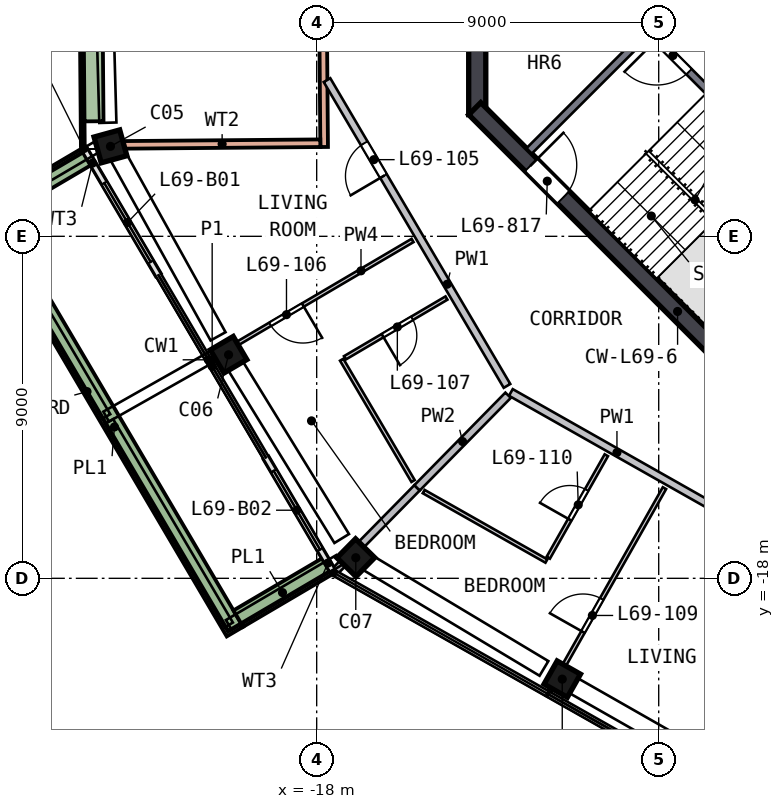
"""IFC4 building model, lengths in metres.
Left out: names, types, materials, properties, quantities, classifications, styles, units other than length and angle.
Written with IfcOpenShell. Run it as: python <this file> out.ifc"""

import sys

from ifc_helpers import new_model, si_unit, direction, frame, frame_2d, origin, origin_2d, place, context, subcontext, project, spatial, rectangle, extrude, element, fill, save


model = new_model("IFC4")
c1 = context("Model", 3, precision=1e-05, world=origin(), true_north=direction((0.0, 1.0)))
c2 = subcontext(c1, "Body", "Model", "MODEL_VIEW")
j1 = project(units=[si_unit("LENGTHUNIT", "METRE"), si_unit("PLANEANGLEUNIT", "RADIAN")], contexts=[c1])
p1 = place(None, origin())
s1 = spatial("IfcSite", under=j1, at=p1, CompositionType="ELEMENT")
p2 = place(p1, origin())
s2 = spatial("IfcBuilding", under=s1, at=p2, CompositionType="ELEMENT")
p3 = place(p2, frame((0.0, 0.0, 281.0)))
s3 = spatial("IfcBuildingStorey", under=s2, at=p3, CompositionType="ELEMENT", Elevation=281.0)
p4 = place(p3, frame((-23.465, -6.499, 0.0), z_axis=(0.031776427, -0.111293516, 0.993279423), x_axis=(-0.264583542, 0.95739256, 0.115736922)))
e1 = element("IfcColumn", 1, at=p4, inside=s3, PredefinedType="COLUMN", context=c2, shape_type="SweptSolid", body=[
    extrude(rectangle(XDim=0.7, YDim=0.7, at=origin_2d()), origin(), (0.0, 0.0, 1.0), 3.211),
])
p5 = place(p3, frame((-20.389, -12.0, 0.0), z_axis=(0.057948635, -0.096505009, 0.993644171), x_axis=(0.504275135, -0.856175349, -0.112562695)))
e2 = element("IfcColumn", 2, at=p5, inside=s3, PredefinedType="COLUMN", context=c2, shape_type="SweptSolid", body=[
    extrude(rectangle(XDim=0.7, YDim=0.7, at=origin_2d()), origin(), (0.0, 0.0, 1.0), 3.21),
])
p6 = place(p3, frame((-17.072, -17.36, 0.0), z_axis=(0.083241478, -0.080504772, 0.993272288), x_axis=(-0.70810012, 0.696552232, 0.115798136)))
e3 = element("IfcColumn", 3, at=p6, inside=s3, PredefinedType="COLUMN", context=c2, shape_type="SweptSolid", body=[
    extrude(rectangle(XDim=0.7, YDim=0.7, at=origin_2d()), origin(), (0.0, 0.0, 1.0), 3.211),
])
p7 = place(p3, frame((-11.657, -20.587, 0.0), z_axis=(0.098331196, -0.054603093, 0.993654607), x_axis=(0.864581294, -0.489744386, -0.112470541)))
e4 = element("IfcColumn", 4, at=p7, inside=s3, PredefinedType="COLUMN", context=c2, shape_type="SweptSolid", body=[
    extrude(rectangle(XDim=0.7, YDim=0.7, at=origin_2d()), origin(), (0.0, 0.0, 1.0), 3.21),
])
p8 = place(p3, frame((-13.775, 5.799, 0.0), z_axis=(0.0, 0.0, 1.0), x_axis=(0.0, -1.0, 0.0)))
e5 = element("IfcWall", 5, at=p8, inside=s3, PredefinedType="SHEAR", context=c2, shape_type="SweptSolid", body=[
    extrude(rectangle(XDim=11.598, YDim=0.45, at=frame_2d((5.799, 0.0))), origin(), (0.0, 0.0, 1.0), 3.5),
])
p9 = place(p8, frame((4.899, 0.0, 0.0)))
e6 = element("IfcOpeningElement", 6, at=p9, cuts=e5, PredefinedType="OPENING", context=c2, shape_type="SweptSolid", body=[
    extrude(rectangle(XDim=1.8, YDim=2.1, at=frame_2d((0.9, 1.05))), frame((0.0, 0.235, 0.0), z_axis=(0.0, -1.0, 0.0), x_axis=(1.0, 0.0, 0.0)), (0.0, 0.0, 1.0), 0.47),
])
p10 = place(p3, frame((-13.841, -5.64, 0.0), z_axis=(0.0, 0.0, 1.0), x_axis=(0.707106781, -0.707106781, 0.0)))
e7 = element("IfcWall", 7, at=p10, inside=s3, PredefinedType="SHEAR", context=c2, shape_type="SweptSolid", body=[
    extrude(rectangle(XDim=11.598, YDim=0.45, at=frame_2d((5.799, 0.0))), origin(), (0.0, 0.0, 1.0), 3.5),
])
p11 = place(p10, frame((2.099, 0.0, 0.0)))
e8 = element("IfcOpeningElement", 8, at=p11, cuts=e7, PredefinedType="OPENING", context=c2, shape_type="SweptSolid", body=[
    extrude(rectangle(XDim=1.2, YDim=2.1, at=frame_2d((0.6, 1.05))), frame((0.0, 0.235, 0.0), z_axis=(0.0, -1.0, 0.0), x_axis=(1.0, 0.0, 0.0)), (0.0, 0.0, 1.0), 0.47),
])
p12 = place(p3, frame((-24.108, -6.717, 0.0), z_axis=(0.0, 0.0, 1.0), x_axis=(0.507234784, -0.86180791, 0.0)))
e9 = element("IfcWall", 9, at=p12, inside=s3, PredefinedType="SOLIDWALL", context=c2, shape_type="SweptSolid", body=[
    extrude(rectangle(XDim=3.827, YDim=0.15, at=frame_2d((1.914, 0.0))), origin(), (0.0, 0.0, 1.0), 2.525),
])
p13 = place(p12, frame((1.027, 0.0, 0.0)))
e10 = element("IfcOpeningElement", 10, at=p13, cuts=e9, PredefinedType="OPENING", context=c2, shape_type="SweptSolid", body=[
    extrude(rectangle(XDim=2.4, YDim=2.4, at=frame_2d((1.2, 1.2))), frame((0.0, 0.085, 0.0), z_axis=(0.0, -1.0, 0.0), x_axis=(1.0, 0.0, 0.0)), (0.0, 0.0, 1.0), 0.17),
])
p14 = place(p3, frame((-19.333, -14.829, 0.0), z_axis=(0.0, 0.0, 1.0), x_axis=(0.507216275, -0.861818804, 0.0)))
e11 = element("IfcWall", 11, at=p14, inside=s3, PredefinedType="SOLIDWALL", context=c2, shape_type="SweptSolid", body=[
    extrude(rectangle(XDim=3.427, YDim=0.15, at=frame_2d((1.713, 0.0))), origin(), (0.0, 0.0, 1.0), 2.525),
])
p15 = place(p14, frame((0.4, 0.0, 0.0)))
e12 = element("IfcOpeningElement", 12, at=p15, cuts=e11, PredefinedType="OPENING", context=c2, shape_type="SweptSolid", body=[
    extrude(rectangle(XDim=2.4, YDim=2.4, at=frame_2d((1.2, 1.2))), frame((0.0, 0.085, 0.0), z_axis=(0.0, -1.0, 0.0), x_axis=(1.0, 0.0, 0.0)), (0.0, 0.0, 1.0), 0.17),
])
p16 = place(p3, frame((-24.077, -6.919, 0.0), z_axis=(0.0, 0.0, 1.0), x_axis=(-0.861812548, -0.507226904, 0.0)))
e13 = element("IfcWall", 13, at=p16, inside=s3, PredefinedType="SOLIDWALL", context=c2, shape_type="SweptSolid", body=[
    extrude(rectangle(XDim=3.199, YDim=0.5, at=frame_2d((1.6, 0.0))), origin(), (0.0, 0.0, 1.0), 0.7),
])
p17 = place(p3, frame((-26.492, -8.63, 0.0), z_axis=(0.0, 0.0, 1.0), x_axis=(0.507233502, -0.861808665, 0.0)))
e14 = element("IfcWall", 14, at=p17, inside=s3, PredefinedType="SOLIDWALL", context=c2, shape_type="SweptSolid", body=[
    extrude(rectangle(XDim=12.5, YDim=0.5, at=frame_2d((6.25, 0.0))), origin(), (0.0, 0.0, 1.0), 0.7),
])
p18 = place(p3, frame((-20.063, -19.061, 0.0), z_axis=(0.0, 0.0, 1.0), x_axis=(0.861843515, 0.507174285, 0.0)))
e15 = element("IfcWall", 15, at=p18, inside=s3, PredefinedType="SOLIDWALL", context=c2, shape_type="SweptSolid", body=[
    extrude(rectangle(XDim=2.699, YDim=0.5, at=frame_2d((1.35, 0.0))), origin(), (0.0, 0.0, 1.0), 0.7),
])
p19 = place(p3, frame((-17.803, -6.649, 0.0), z_axis=(0.0, 0.0, 1.0), x_axis=(-0.008375922, 0.999964921, 0.0)))
e16 = element("IfcWall", 16, at=p19, inside=s3, PredefinedType="SOLIDWALL", context=c2, shape_type="SweptSolid", body=[
    extrude(rectangle(XDim=13.0, YDim=0.2, at=frame_2d((6.5, 0.0))), origin(), (0.0, 0.0, 1.0), 3.19),
])
p20 = place(p19, frame((5.6, 0.0, 0.0)))
e17 = element("IfcOpeningElement", 17, at=p20, cuts=e16, PredefinedType="OPENING", context=c2, shape_type="SweptSolid", body=[
    extrude(rectangle(XDim=1.8, YDim=2.4, at=frame_2d((0.9, 1.2))), frame((0.0, 0.11, 0.0), z_axis=(0.0, -1.0, 0.0), x_axis=(1.0, 0.0, 0.0)), (0.0, 0.0, 1.0), 0.22),
])
p21 = place(p3, frame((-23.072, -6.594, 0.0), z_axis=(0.0, 0.0, 1.0), x_axis=(0.999965043, 0.008361386, 0.0)))
e18 = element("IfcWall", 18, at=p21, inside=s3, PredefinedType="SOLIDWALL", context=c2, shape_type="SweptSolid", body=[
    extrude(rectangle(XDim=5.168, YDim=0.2, at=frame_2d((2.584, 0.0))), origin(), (0.0, 0.0, 1.0), 3.19),
])
p22 = place(p3, frame((-24.261, 6.217, 0.0), z_axis=(0.0, 0.0, 1.0), x_axis=(0.008366158, -0.999965003, 0.0)))
e19 = element("IfcWall", 19, at=p22, inside=s3, PredefinedType="SOLIDWALL", context=c2, shape_type="SweptSolid", body=[
    extrude(rectangle(XDim=12.84, YDim=0.1, at=frame_2d((6.42, 0.0))), origin(), (0.0, 0.0, 1.0), 0.7),
])
p23 = place(p3, frame((-23.901, -1.011, 0.0), z_axis=(0.0, 0.0, 1.0), x_axis=(0.008364614, -0.999965016, 0.0)))
e20 = element("IfcWall", 20, at=p23, inside=s3, PredefinedType="SOLIDWALL", context=c2, shape_type="SweptSolid", body=[
    extrude(rectangle(XDim=4.962, YDim=0.5, at=frame_2d((2.481, 0.0))), origin(), (0.0, 0.0, 1.0), 0.7),
])
p24 = place(p3, frame((-3.535, -9.334, 0.0), z_axis=(0.0, 0.0, 1.0), x_axis=(-0.707120946, 0.707092617, 0.0)))
e21 = element("IfcWall", 21, at=p24, inside=s3, PredefinedType="SOLIDWALL", context=c2, shape_type="SweptSolid", body=[
    extrude(rectangle(XDim=8.618, YDim=0.2, at=frame_2d((4.309, 0.0))), origin(), (0.0, 0.0, 1.0), 3.19),
])
p25 = place(p24, frame((6.6, 0.0, 0.0)))
e22 = element("IfcOpeningElement", 22, at=p25, cuts=e21, PredefinedType="OPENING", context=c2, shape_type="SweptSolid", body=[
    extrude(rectangle(XDim=1.2, YDim=2.1, at=frame_2d((0.6, 1.05))), frame((0.0, 0.11, 0.0), z_axis=(0.0, -1.0, 0.0), x_axis=(1.0, 0.0, 0.0)), (0.0, 0.0, 1.0), 0.22),
])
p26 = place(p3, frame((-9.334, -3.677, 0.0), z_axis=(0.0, 0.0, 1.0), x_axis=(-0.707106781, -0.707106781, 0.0)))
e23 = element("IfcWall", 23, at=p26, inside=s3, PredefinedType="SOLIDWALL", context=c2, shape_type="SweptSolid", body=[
    extrude(rectangle(XDim=4.35, YDim=0.2, at=frame_2d((2.175, 0.0))), origin(), (0.0, 0.0, 1.0), 3.19),
])
p27 = place(p3, frame((-12.992, -12.936, 0.0), z_axis=(0.0, 0.0, 1.0), x_axis=(-0.507232662, 0.861809159, 0.0)))
e24 = element("IfcWall", 24, at=p27, inside=s3, PredefinedType="SOLIDWALL", context=c2, shape_type="SweptSolid", body=[
    extrude(rectangle(XDim=9.337, YDim=0.2, at=frame_2d((4.668, 0.0))), origin(), (0.0, 0.0, 1.0), 3.19),
])
p28 = place(p27, frame((6.408, 0.0, 0.0)))
e25 = element("IfcOpeningElement", 25, at=p28, cuts=e24, PredefinedType="OPENING", context=c2, shape_type="SweptSolid", body=[
    extrude(rectangle(XDim=1.0, YDim=2.1, at=frame_2d((0.5, 1.05))), frame((0.0, 0.11, 0.0), z_axis=(0.0, -1.0, 0.0), x_axis=(1.0, 0.0, 0.0)), (0.0, 0.0, 1.0), 0.22),
])
p29 = place(p3, frame((-4.609, -17.798, 0.0), z_axis=(0.0, 0.0, 1.0), x_axis=(-0.870179862, 0.492734216, 0.0)))
e26 = element("IfcWall", 26, at=p29, inside=s3, PredefinedType="SOLIDWALL", context=c2, shape_type="SweptSolid", body=[
    extrude(rectangle(XDim=9.517, YDim=0.2, at=frame_2d((4.758, 0.0))), origin(), (0.0, 0.0, 1.0), 3.19),
])
p30 = place(p29, frame((1.9, 0.0, 0.0)))
e27 = element("IfcOpeningElement", 27, at=p30, cuts=e26, PredefinedType="OPENING", context=c2, shape_type="SweptSolid", body=[
    extrude(rectangle(XDim=1.0, YDim=2.1, at=frame_2d((0.5, 1.05))), frame((0.0, 0.11, 0.0), z_axis=(0.0, -1.0, 0.0), x_axis=(1.0, 0.0, 0.0)), (0.0, 0.0, 1.0), 0.22),
])
p31 = place(p3, frame((-15.359, -15.618, 0.0), z_axis=(0.0, 0.0, 1.0), x_axis=(-0.701177139, -0.71298711, 0.0)))
e28 = element("IfcWall", 28, at=p31, inside=s3, PredefinedType="SOLIDWALL", context=c2, shape_type="SweptSolid", body=[
    extrude(rectangle(XDim=3.06, YDim=0.2, at=frame_2d((1.53, 0.0))), origin(), (0.0, 0.0, 1.0), 3.19),
])
p32 = place(p3, frame((-12.963, -13.182, 0.0), z_axis=(0.0, 0.0, 1.0), x_axis=(-0.701186576, -0.71297783, 0.0)))
e29 = element("IfcWall", 29, at=p32, inside=s3, PredefinedType="SOLIDWALL", context=c2, shape_type="SweptSolid", body=[
    extrude(rectangle(XDim=3.416, YDim=0.2, at=frame_2d((1.708, 0.0))), origin(), (0.0, 0.0, 1.0), 3.19),
])
p33 = place(p3, frame((-15.477, -9.109, 0.0), z_axis=(0.0, 0.0, 1.0), x_axis=(-0.861795394, -0.507256048, 0.0)))
e30 = element("IfcWall", 30, at=p33, inside=s3, PredefinedType="PARTITIONING", context=c2, shape_type="SweptSolid", body=[
    extrude(rectangle(XDim=6.15, YDim=0.1, at=frame_2d((3.075, 0.0))), origin(), (0.0, 0.0, 1.0), 3.19),
])
p34 = place(p33, frame((3.35, 0.0, 0.0)))
e31 = element("IfcOpeningElement", 31, at=p34, cuts=e30, PredefinedType="OPENING", context=c2, shape_type="SweptSolid", body=[
    extrude(rectangle(XDim=1.0, YDim=2.1, at=frame_2d((0.5, 1.05))), frame((0.0, 0.06, 0.0), z_axis=(0.0, -1.0, 0.0), x_axis=(1.0, 0.0, 0.0)), (0.0, 0.0, 1.0), 0.12),
])
p35 = place(p3, frame((-17.343, -12.248, 0.0), z_axis=(0.0, 0.0, 1.0), x_axis=(0.507256305, -0.861795243, 0.0)))
e32 = element("IfcWall", 32, at=p35, inside=s3, PredefinedType="PARTITIONING", context=c2, shape_type="SweptSolid", body=[
    extrude(rectangle(XDim=3.704, YDim=0.1, at=frame_2d((1.852, 0.0))), origin(), (0.0, 0.0, 1.0), 3.19),
])
p36 = place(p3, frame((-14.585, -10.625, 0.0), z_axis=(0.0, 0.0, 1.0), x_axis=(-0.861798542, -0.5072507, 0.0)))
e33 = element("IfcWall", 33, at=p36, inside=s3, PredefinedType="PARTITIONING", context=c2, shape_type="SweptSolid", body=[
    extrude(rectangle(XDim=3.1, YDim=0.1, at=frame_2d((1.55, 0.0))), origin(), (0.0, 0.0, 1.0), 3.19),
])
p37 = place(p36, frame((1.05, 0.0, 0.0)))
e34 = element("IfcOpeningElement", 34, at=p37, cuts=e33, PredefinedType="OPENING", context=c2, shape_type="SweptSolid", body=[
    extrude(rectangle(XDim=0.9, YDim=2.1, at=frame_2d((0.45, 1.05))), frame((0.0, 0.06, 0.0), z_axis=(0.0, -1.0, 0.0), x_axis=(1.0, 0.0, 0.0)), (0.0, 0.0, 1.0), 0.12),
])
p38 = place(p3, frame((-15.185, -15.717, 0.0), z_axis=(0.0, 0.0, 1.0), x_axis=(0.870171703, -0.492748625, 0.0)))
e35 = element("IfcWall", 35, at=p38, inside=s3, PredefinedType="PARTITIONING", context=c2, shape_type="SweptSolid", body=[
    extrude(rectangle(XDim=3.711, YDim=0.1, at=frame_2d((1.855, 0.0))), origin(), (0.0, 0.0, 1.0), 3.19),
])
p39 = place(p3, frame((-11.906, -17.458, 0.0), z_axis=(0.0, 0.0, 1.0), x_axis=(0.492708506, 0.870194419, 0.0)))
e36 = element("IfcWall", 36, at=p39, inside=s3, PredefinedType="PARTITIONING", context=c2, shape_type="SweptSolid", body=[
    extrude(rectangle(XDim=3.1, YDim=0.1, at=frame_2d((1.55, 0.0))), origin(), (0.0, 0.0, 1.0), 3.19),
])
p40 = place(p39, frame((1.15, 0.0, 0.0)))
e37 = element("IfcOpeningElement", 37, at=p40, cuts=e36, PredefinedType="OPENING", context=c2, shape_type="SweptSolid", body=[
    extrude(rectangle(XDim=0.9, YDim=2.1, at=frame_2d((0.45, 1.05))), frame((0.0, 0.06, 0.0), z_axis=(0.0, -1.0, 0.0), x_axis=(1.0, 0.0, 0.0)), (0.0, 0.0, 1.0), 0.12),
])
p41 = place(p3, frame((-11.879, -20.979, 0.0), z_axis=(0.0, 0.0, 1.0), x_axis=(0.492715069, 0.870190704, 0.0)))
e38 = element("IfcWall", 38, at=p41, inside=s3, PredefinedType="PARTITIONING", context=c2, shape_type="SweptSolid", body=[
    extrude(rectangle(XDim=6.15, YDim=0.1, at=frame_2d((3.075, 0.0))), origin(), (0.0, 0.0, 1.0), 3.19),
])
p42 = place(p41, frame((1.8, 0.0, 0.0)))
e39 = element("IfcOpeningElement", 39, at=p42, cuts=e38, PredefinedType="OPENING", context=c2, shape_type="SweptSolid", body=[
    extrude(rectangle(XDim=1.0, YDim=2.1, at=frame_2d((0.5, 1.05))), frame((0.0, 0.06, 0.0), z_axis=(0.0, -1.0, 0.0), x_axis=(1.0, 0.0, 0.0)), (0.0, 0.0, 1.0), 0.12),
])
p43 = place(p13, origin())
e40 = element("IfcDoor", 40, at=p43, inside=s3, OperationType="SLIDING_TO_LEFT", PredefinedType="DOOR", context=c2, shape_type="SweptSolid", body=[
    extrude(rectangle(XDim=2.4, YDim=2.4, at=frame_2d((1.2, 1.2))), frame((0.0, 0.025, 0.0), z_axis=(0.0, -1.0, 0.0), x_axis=(1.0, 0.0, 0.0)), (0.0, 0.0, 1.0), 0.05),
])
fill(e10, e40)
p44 = place(p15, origin())
e41 = element("IfcDoor", 41, at=p44, inside=s3, OperationType="SLIDING_TO_RIGHT", PredefinedType="DOOR", context=c2, shape_type="SweptSolid", body=[
    extrude(rectangle(XDim=2.4, YDim=2.4, at=frame_2d((1.2, 1.2))), frame((0.0, 0.025, 0.0), z_axis=(0.0, -1.0, 0.0), x_axis=(1.0, 0.0, 0.0)), (0.0, 0.0, 1.0), 0.05),
])
fill(e12, e41)
p45 = place(p25, origin())
e42 = element("IfcDoor", 42, at=p45, inside=s3, OperationType="SINGLE_SWING_RIGHT", PredefinedType="DOOR", context=c2, shape_type="SweptSolid", body=[
    extrude(rectangle(XDim=1.2, YDim=2.1, at=frame_2d((0.6, 1.05))), frame((0.0, 0.025, 0.0), z_axis=(0.0, -1.0, 0.0), x_axis=(1.0, 0.0, 0.0)), (0.0, 0.0, 1.0), 0.05),
])
fill(e22, e42)
p46 = place(p11, origin())
e43 = element("IfcDoor", 43, at=p46, inside=s3, OperationType="SINGLE_SWING_LEFT", PredefinedType="DOOR", context=c2, shape_type="SweptSolid", body=[
    extrude(rectangle(XDim=1.2, YDim=2.1, at=frame_2d((0.6, 1.05))), frame((0.0, 0.025, 0.0), z_axis=(0.0, -1.0, 0.0), x_axis=(1.0, 0.0, 0.0)), (0.0, 0.0, 1.0), 0.05),
])
fill(e8, e43)
p47 = place(p28, origin())
e44 = element("IfcDoor", 44, at=p47, inside=s3, OperationType="SINGLE_SWING_LEFT", PredefinedType="DOOR", context=c2, shape_type="SweptSolid", body=[
    extrude(rectangle(XDim=1.0, YDim=2.1, at=frame_2d((0.5, 1.05))), frame((0.0, 0.025, 0.0), z_axis=(0.0, -1.0, 0.0), x_axis=(1.0, 0.0, 0.0)), (0.0, 0.0, 1.0), 0.05),
])
fill(e25, e44)
p48 = place(p34, origin())
e45 = element("IfcDoor", 45, at=p48, inside=s3, OperationType="SINGLE_SWING_LEFT", PredefinedType="DOOR", context=c2, shape_type="SweptSolid", body=[
    extrude(rectangle(XDim=1.0, YDim=2.1, at=frame_2d((0.5, 1.05))), frame((0.0, 0.025, 0.0), z_axis=(0.0, -1.0, 0.0), x_axis=(1.0, 0.0, 0.0)), (0.0, 0.0, 1.0), 0.05),
])
fill(e31, e45)
p49 = place(p37, origin())
e46 = element("IfcDoor", 46, at=p49, inside=s3, OperationType="SINGLE_SWING_RIGHT", PredefinedType="DOOR", context=c2, shape_type="SweptSolid", body=[
    extrude(rectangle(XDim=0.9, YDim=2.1, at=frame_2d((0.45, 1.05))), frame((0.0, 0.025, 0.0), z_axis=(0.0, -1.0, 0.0), x_axis=(1.0, 0.0, 0.0)), (0.0, 0.0, 1.0), 0.05),
])
fill(e34, e46)
p50 = place(p42, origin())
e47 = element("IfcDoor", 47, at=p50, inside=s3, OperationType="SINGLE_SWING_LEFT", PredefinedType="DOOR", context=c2, shape_type="SweptSolid", body=[
    extrude(rectangle(XDim=1.0, YDim=2.1, at=frame_2d((0.5, 1.05))), frame((0.0, 0.025, 0.0), z_axis=(0.0, -1.0, 0.0), x_axis=(1.0, 0.0, 0.0)), (0.0, 0.0, 1.0), 0.05),
])
fill(e39, e47)
p51 = place(p40, origin())
e48 = element("IfcDoor", 48, at=p51, inside=s3, OperationType="SINGLE_SWING_LEFT", PredefinedType="DOOR", context=c2, shape_type="SweptSolid", body=[
    extrude(rectangle(XDim=0.9, YDim=2.1, at=frame_2d((0.45, 1.05))), frame((0.0, 0.025, 0.0), z_axis=(0.0, -1.0, 0.0), x_axis=(1.0, 0.0, 0.0)), (0.0, 0.0, 1.0), 0.05),
])
fill(e37, e48)
save(model, sys.argv[1])
